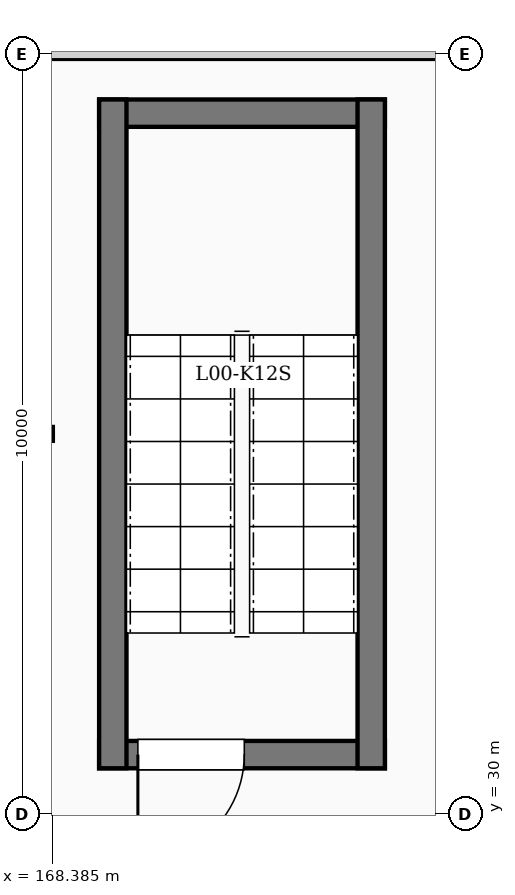
"""IFC4 building model, lengths in metres.
Left out: names, types, materials, properties, quantities, classifications, styles, units other than length and angle.
Written with IfcOpenShell. Run it as: python <this file> out.ifc"""

import sys

from ifc_helpers import new_model, si_unit, direction, frame, frame_2d, origin, place, context, subcontext, project, spatial, rectangle, extrude, element, fill, save


model = new_model("IFC4")
c1 = context("Model", 3, precision=1e-05, world=origin(), true_north=direction((0.0, 1.0)))
c2 = subcontext(c1, "Body", "Model", "MODEL_VIEW")
j1 = project(units=[si_unit("LENGTHUNIT", "METRE"), si_unit("PLANEANGLEUNIT", "RADIAN")], contexts=[c1])
p1 = place(None, origin())
s1 = spatial("IfcSite", under=j1, at=p1, CompositionType="ELEMENT")
p2 = place(p1, origin())
s2 = spatial("IfcBuilding", under=s1, at=p2, CompositionType="ELEMENT")
p3 = place(p2, origin())
s3 = spatial("IfcBuildingStorey", under=s2, at=p3, CompositionType="ELEMENT", Elevation=0.0)
p4 = place(p3, frame((169.0, 30.78, 0.0), z_axis=(0.0, 0.0, 1.0), x_axis=(1.0, 0.0, 0.0)))
e1 = element("IfcWall", 1, at=p4, inside=s3, PredefinedType="SHEAR", context=c2, shape_type="SweptSolid", body=[
    extrude(rectangle(XDim=3.76, YDim=0.36, at=frame_2d((1.88, 0.0))), origin(), (0.0, 0.0, 1.0), 5.4),
])
p5 = place(p4, frame((0.51, 0.0, 0.0)))
e2 = element("IfcOpeningElement", 2, at=p5, cuts=e1, PredefinedType="OPENING", context=c2, shape_type="SweptSolid", body=[
    extrude(rectangle(XDim=1.4, YDim=2.35, at=frame_2d((0.7, 1.175))), frame((0.0, 0.19, 0.0), z_axis=(0.0, -1.0, 0.0), x_axis=(1.0, 0.0, 0.0)), (0.0, 0.0, 1.0), 0.38),
])
p6 = place(p3, frame((169.0, 39.22, 0.0), z_axis=(0.0, 0.0, 1.0), x_axis=(1.0, 0.0, 0.0)))
e3 = element("IfcWall", 3, at=p6, inside=s3, PredefinedType="SHEAR", context=c2, shape_type="SweptSolid", body=[
    extrude(rectangle(XDim=3.76, YDim=0.36, at=frame_2d((1.88, 0.0))), origin(), (0.0, 0.0, 1.0), 5.4),
])
for number, where, z_axis, x_axis in (
    (4, (169.18, 30.6, 0.0), (0.0, 0.0, 1.0), (0.0, 1.0, 0.0)),
    (5, (172.58, 30.6, 0.0), (0.0, 0.0, 1.0), (0.0, 1.0, 0.0)),
):
    element("IfcWall", number, at=place(p3, frame(where, z_axis=z_axis, x_axis=x_axis)), inside=s3, PredefinedType="SHEAR", context=c2, shape_type="SweptSolid", body=[
        extrude(rectangle(XDim=8.8, YDim=0.36, at=frame_2d((4.4, 0.0))), origin(), (0.0, 0.0, 1.0), 5.4),
    ])
p7 = place(p3, frame((156.6, 35.0, 0.0), z_axis=(0.0, 0.0, 1.0), x_axis=(1.0, 0.0, 0.0)))
e6 = element("IfcWall", 6, at=p7, inside=s3, PredefinedType="PARTITIONING", context=c2, shape_type="SweptSolid", body=[
    extrude(rectangle(XDim=11.8, YDim=0.2, at=frame_2d((5.9, 0.0))), origin(), (0.0, 0.0, 1.0), 5.06),
])
p8 = place(p7, frame((2.342, 0.0, 0.0)))
e7 = element("IfcOpeningElement", 7, at=p8, cuts=e6, PredefinedType="OPENING", context=c2, shape_type="SweptSolid", body=[
    extrude(rectangle(XDim=0.98, YDim=2.3, at=frame_2d((0.49, 1.15))), frame((0.0, 0.11, 0.0), z_axis=(0.0, -1.0, 0.0), x_axis=(1.0, 0.0, 0.0)), (0.0, 0.0, 1.0), 0.22),
])
p9 = place(p7, frame((8.428, 0.0, 0.0)))
e8 = element("IfcOpeningElement", 8, at=p9, cuts=e6, PredefinedType="OPENING", context=c2, shape_type="SweptSolid", body=[
    extrude(rectangle(XDim=1.08, YDim=2.35, at=frame_2d((0.54, 1.175))), frame((0.0, 0.11, 0.0), z_axis=(0.0, -1.0, 0.0), x_axis=(1.0, 0.0, 0.0)), (0.0, 0.0, 1.0), 0.22),
])
p10 = place(p3, frame((156.6, 40.0, 0.0), z_axis=(0.0, 0.0, 1.0), x_axis=(1.0, 0.0, 0.0)))
e9 = element("IfcWall", 9, at=p10, inside=s3, PredefinedType="PARTITIONING", context=c2, shape_type="SweptSolid", body=[
    extrude(rectangle(XDim=18.6, YDim=0.15, at=frame_2d((9.3, 0.0))), origin(), (0.0, 0.0, 1.0), 4.59),
])
p11 = place(p5, origin())
e10 = element("IfcDoor", 10, at=p11, inside=s3, OperationType="SINGLE_SWING_LEFT", PredefinedType="DOOR", context=c2, shape_type="SweptSolid", body=[
    extrude(rectangle(XDim=1.4, YDim=2.35, at=frame_2d((0.7, 1.175))), frame((0.0, 0.025, 0.0), z_axis=(0.0, -1.0, 0.0), x_axis=(1.0, 0.0, 0.0)), (0.0, 0.0, 1.0), 0.05),
])
fill(e2, e10)
save(model, sys.argv[1])
